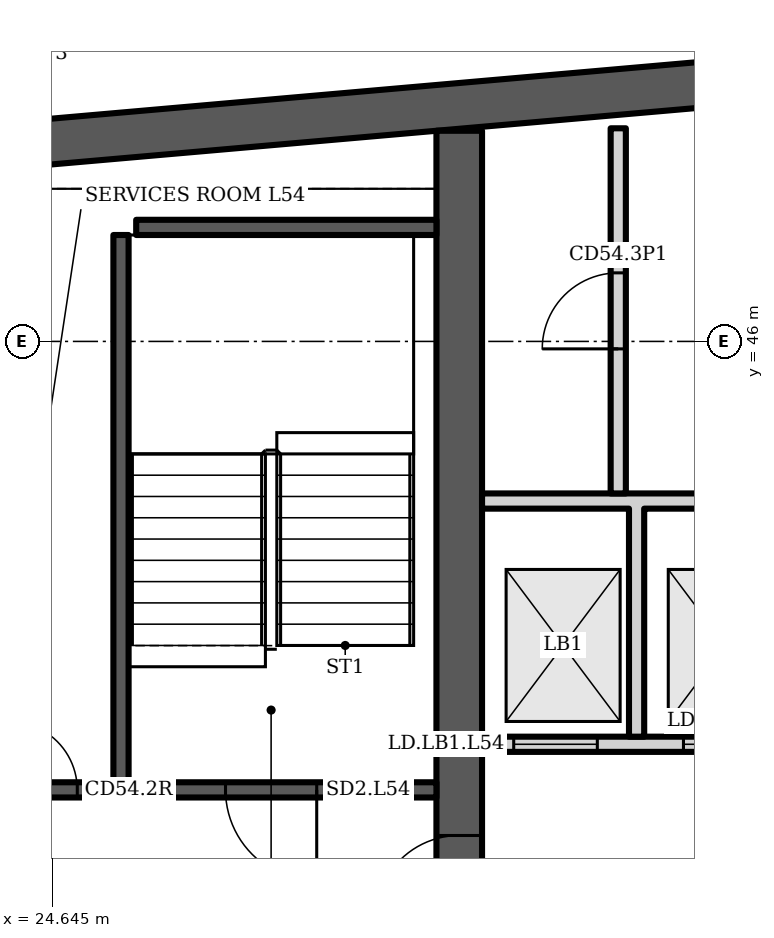
"""IFC4 building model, lengths in metres.
Left out: names, types, materials, properties, quantities, classifications, styles, units other than length and angle.
Written with IfcOpenShell. Run it as: python <this file> out.ifc"""

import sys

from ifc_helpers import new_model, si_unit, direction, frame, frame_2d, origin, place, context, subcontext, project, spatial, polyline, rectangle, outline, extrude, element, fill, save


model = new_model("IFC4")
c1 = context("Model", 3, precision=1e-05, world=origin(), true_north=direction((0.0, 1.0)))
c2 = subcontext(c1, "Body", "Model", "MODEL_VIEW")
j1 = project(units=[si_unit("LENGTHUNIT", "METRE"), si_unit("PLANEANGLEUNIT", "RADIAN")], contexts=[c1])
p1 = place(None, origin())
s1 = spatial("IfcSite", under=j1, at=p1, CompositionType="ELEMENT")
p2 = place(p1, origin())
s2 = spatial("IfcBuilding", under=s1, at=p2, CompositionType="ELEMENT")
p3 = place(p2, frame((0.0, 0.0, 217.9)))
s3 = spatial("IfcBuildingStorey", under=s2, at=p3, CompositionType="ELEMENT", Elevation=217.9)
p4 = place(p3, origin())
e1 = element("IfcWall", 1, at=p4, inside=s3, PredefinedType="SHEAR", context=c2, shape_type="SweptSolid", body=[
    extrude(outline(polyline([(23.0, 48.185), (40.5, 49.716), (58.0, 48.185), (58.0, 48.787), (40.5, 50.318), (23.0, 48.787), (23.0, 48.185)])), origin(), (0.0, 0.0, 1.0), 3.6),
])
p5 = place(p3, frame((30.0, 34.6, 0.0), z_axis=(0.0, 0.0, 1.0), x_axis=(0.0, 1.0, 0.0)))
e2 = element("IfcWall", 2, at=p5, inside=s3, PredefinedType="SHEAR", context=c2, shape_type="SweptSolid", body=[
    extrude(rectangle(XDim=14.171, YDim=0.6, at=frame_2d((7.085, 0.0))), origin(), (0.0, 0.0, 1.0), 3.6),
])
p6 = place(p5, frame((3.8, 0.0, 0.0)))
e3 = element("IfcOpeningElement", 3, at=p6, cuts=e2, PredefinedType="OPENING", context=c2, shape_type="SweptSolid", body=[
    extrude(rectangle(XDim=1.1, YDim=2.1, at=frame_2d((0.55, 1.05))), frame((0.0, 0.31, 0.0), z_axis=(0.0, -1.0, 0.0), x_axis=(1.0, 0.0, 0.0)), (0.0, 0.0, 1.0), 0.62),
])
p7 = place(p3, frame((23.6, 40.1, 0.0), z_axis=(0.0, 0.0, 1.0), x_axis=(1.0, 0.0, 0.0)))
e4 = element("IfcWall", 4, at=p7, inside=s3, PredefinedType="SHEAR", context=c2, shape_type="SweptSolid", body=[
    extrude(rectangle(XDim=6.1, YDim=0.2, at=frame_2d((3.05, 0.0))), origin(), (0.0, 0.0, 1.0), 3.2),
])
p8 = place(p7, frame((3.325, 0.0, 0.0)))
e5 = element("IfcOpeningElement", 5, at=p8, cuts=e4, PredefinedType="OPENING", context=c2, shape_type="SweptSolid", body=[
    extrude(rectangle(XDim=1.2, YDim=2.1, at=frame_2d((0.6, 1.05))), frame((0.0, 0.11, 0.0), z_axis=(0.0, -1.0, 0.0), x_axis=(1.0, 0.0, 0.0)), (0.0, 0.0, 1.0), 0.22),
])
p9 = place(p7, frame((0.475, 0.0, 0.0)))
e6 = element("IfcOpeningElement", 6, at=p9, cuts=e4, PredefinedType="OPENING", context=c2, shape_type="SweptSolid", body=[
    extrude(rectangle(XDim=0.9, YDim=2.1, at=frame_2d((0.45, 1.05))), frame((0.0, 0.11, 0.0), z_axis=(0.0, -1.0, 0.0), x_axis=(1.0, 0.0, 0.0)), (0.0, 0.0, 1.0), 0.22),
])
p10 = place(p3, frame((25.55, 40.2, 0.0), z_axis=(0.0, 0.0, 1.0), x_axis=(0.0, 1.0, 0.0)))
e7 = element("IfcWall", 7, at=p10, inside=s3, PredefinedType="SHEAR", context=c2, shape_type="SweptSolid", body=[
    extrude(rectangle(XDim=7.2, YDim=0.2, at=frame_2d((3.6, 0.0))), origin(), (0.0, 0.0, 1.0), 3.2),
])
p11 = place(p3, frame((25.75, 47.5, 0.0), z_axis=(0.0, 0.0, 1.0), x_axis=(1.0, 0.0, 0.0)))
e8 = element("IfcWall", 8, at=p11, inside=s3, PredefinedType="SHEAR", context=c2, shape_type="SweptSolid", body=[
    extrude(rectangle(XDim=3.95, YDim=0.2, at=frame_2d((1.975, 0.0))), origin(), (0.0, 0.0, 1.0), 3.2),
])
p12 = place(p3, frame((30.3, 40.7, 0.0), z_axis=(0.0, 0.0, 1.0), x_axis=(1.0, 0.0, 0.0)))
e9 = element("IfcWall", 9, at=p12, inside=s3, PredefinedType="PARTITIONING", context=c2, shape_type="SweptSolid", body=[
    extrude(rectangle(XDim=6.4, YDim=0.2, at=frame_2d((3.2, 0.0))), origin(), (0.0, 0.0, 1.0), 3.2),
])
p13 = place(p12, frame((0.417, 0.0, 0.0)))
e10 = element("IfcOpeningElement", 10, at=p13, cuts=e9, PredefinedType="OPENING", context=c2, shape_type="SweptSolid", body=[
    extrude(rectangle(XDim=1.1, YDim=2.1, at=frame_2d((0.55, 1.05))), frame((0.0, 0.11, 0.0), z_axis=(0.0, -1.0, 0.0), x_axis=(1.0, 0.0, 0.0)), (0.0, 0.0, 1.0), 0.22),
])
p14 = place(p12, frame((2.65, 0.0, 0.0)))
e11 = element("IfcOpeningElement", 11, at=p14, cuts=e9, PredefinedType="OPENING", context=c2, shape_type="SweptSolid", body=[
    extrude(rectangle(XDim=1.1, YDim=2.1, at=frame_2d((0.55, 1.05))), frame((0.0, 0.11, 0.0), z_axis=(0.0, -1.0, 0.0), x_axis=(1.0, 0.0, 0.0)), (0.0, 0.0, 1.0), 0.22),
])
p15 = place(p12, frame((4.883, 0.0, 0.0)))
e12 = element("IfcOpeningElement", 12, at=p15, cuts=e9, PredefinedType="OPENING", context=c2, shape_type="SweptSolid", body=[
    extrude(rectangle(XDim=1.1, YDim=2.1, at=frame_2d((0.55, 1.05))), frame((0.0, 0.11, 0.0), z_axis=(0.0, -1.0, 0.0), x_axis=(1.0, 0.0, 0.0)), (0.0, 0.0, 1.0), 0.22),
])
p16 = place(p3, origin())
e13 = element("IfcWall", 13, at=p16, inside=s3, PredefinedType="PARTITIONING", context=c2, shape_type="SweptSolid", body=[
    extrude(outline(polyline([(32.433, 40.8), (32.233, 40.8), (32.233, 43.8), (30.3, 43.8), (30.3, 44.0), (36.7, 44.0), (36.7, 43.8), (34.767, 43.8), (34.767, 40.8), (34.567, 40.8), (34.567, 43.8), (32.433, 43.8), (32.433, 40.8)])), origin(), (0.0, 0.0, 1.0), 3.2),
])
p17 = place(p3, frame((32.092, 44.0, 0.0), z_axis=(0.0, 0.0, 1.0), x_axis=(0.0, 1.0, 0.0)))
e14 = element("IfcWall", 14, at=p17, inside=s3, PredefinedType="PARTITIONING", context=c2, shape_type="SweptSolid", body=[
    extrude(rectangle(XDim=4.804, YDim=0.2, at=frame_2d((2.402, 0.0))), origin(), (0.0, 0.0, 1.0), 3.2),
])
p18 = place(p17, frame((1.902, 0.0, 0.0)))
e15 = element("IfcOpeningElement", 15, at=p18, cuts=e14, PredefinedType="OPENING", context=c2, shape_type="SweptSolid", body=[
    extrude(rectangle(XDim=1.0, YDim=2.1, at=frame_2d((0.5, 1.05))), frame((0.0, 0.11, 0.0), z_axis=(0.0, -1.0, 0.0), x_axis=(1.0, 0.0, 0.0)), (0.0, 0.0, 1.0), 0.22),
])
p19 = place(p8, origin())
e16 = element("IfcDoor", 16, at=p19, inside=s3, OperationType="SINGLE_SWING_RIGHT", PredefinedType="DOOR", context=c2, shape_type="SweptSolid", body=[
    extrude(rectangle(XDim=1.2, YDim=2.1, at=frame_2d((0.6, 1.05))), frame((0.0, 0.025, 0.0), z_axis=(0.0, -1.0, 0.0), x_axis=(1.0, 0.0, 0.0)), (0.0, 0.0, 1.0), 0.05),
])
fill(e5, e16)
p20 = place(p9, origin())
e17 = element("IfcDoor", 17, at=p20, inside=s3, OperationType="SINGLE_SWING_LEFT", PredefinedType="DOOR", context=c2, shape_type="SweptSolid", body=[
    extrude(rectangle(XDim=0.9, YDim=2.1, at=frame_2d((0.45, 1.05))), frame((0.0, 0.025, 0.0), z_axis=(0.0, -1.0, 0.0), x_axis=(1.0, 0.0, 0.0)), (0.0, 0.0, 1.0), 0.05),
])
fill(e6, e17)
p21 = place(p13, origin())
e18 = element("IfcDoor", 18, at=p21, inside=s3, OperationType="DOUBLE_DOOR_SLIDING", PredefinedType="DOOR", context=c2, shape_type="SweptSolid", body=[
    extrude(rectangle(XDim=1.1, YDim=2.1, at=frame_2d((0.55, 1.05))), frame((0.0, 0.025, 0.0), z_axis=(0.0, -1.0, 0.0), x_axis=(1.0, 0.0, 0.0)), (0.0, 0.0, 1.0), 0.05),
])
fill(e10, e18)
p22 = place(p14, origin())
e19 = element("IfcDoor", 19, at=p22, inside=s3, OperationType="DOUBLE_DOOR_SLIDING", PredefinedType="DOOR", context=c2, shape_type="SweptSolid", body=[
    extrude(rectangle(XDim=1.1, YDim=2.1, at=frame_2d((0.55, 1.05))), frame((0.0, 0.025, 0.0), z_axis=(0.0, -1.0, 0.0), x_axis=(1.0, 0.0, 0.0)), (0.0, 0.0, 1.0), 0.05),
])
fill(e11, e19)
p23 = place(p18, origin())
e20 = element("IfcDoor", 20, at=p23, inside=s3, OperationType="SINGLE_SWING_LEFT", PredefinedType="DOOR", context=c2, shape_type="SweptSolid", body=[
    extrude(rectangle(XDim=1.0, YDim=2.1, at=frame_2d((0.5, 1.05))), frame((0.0, 0.025, 0.0), z_axis=(0.0, -1.0, 0.0), x_axis=(1.0, 0.0, 0.0)), (0.0, 0.0, 1.0), 0.05),
])
fill(e15, e20)
p24 = place(p6, origin())
e21 = element("IfcDoor", 21, at=p24, inside=s3, OperationType="SINGLE_SWING_LEFT", PredefinedType="DOOR", context=c2, shape_type="SweptSolid", body=[
    extrude(rectangle(XDim=1.1, YDim=2.1, at=frame_2d((0.55, 1.05))), frame((0.0, 0.025, 0.0), z_axis=(0.0, -1.0, 0.0), x_axis=(1.0, 0.0, 0.0)), (0.0, 0.0, 1.0), 0.05),
])
fill(e3, e21)
save(model, sys.argv[1])
